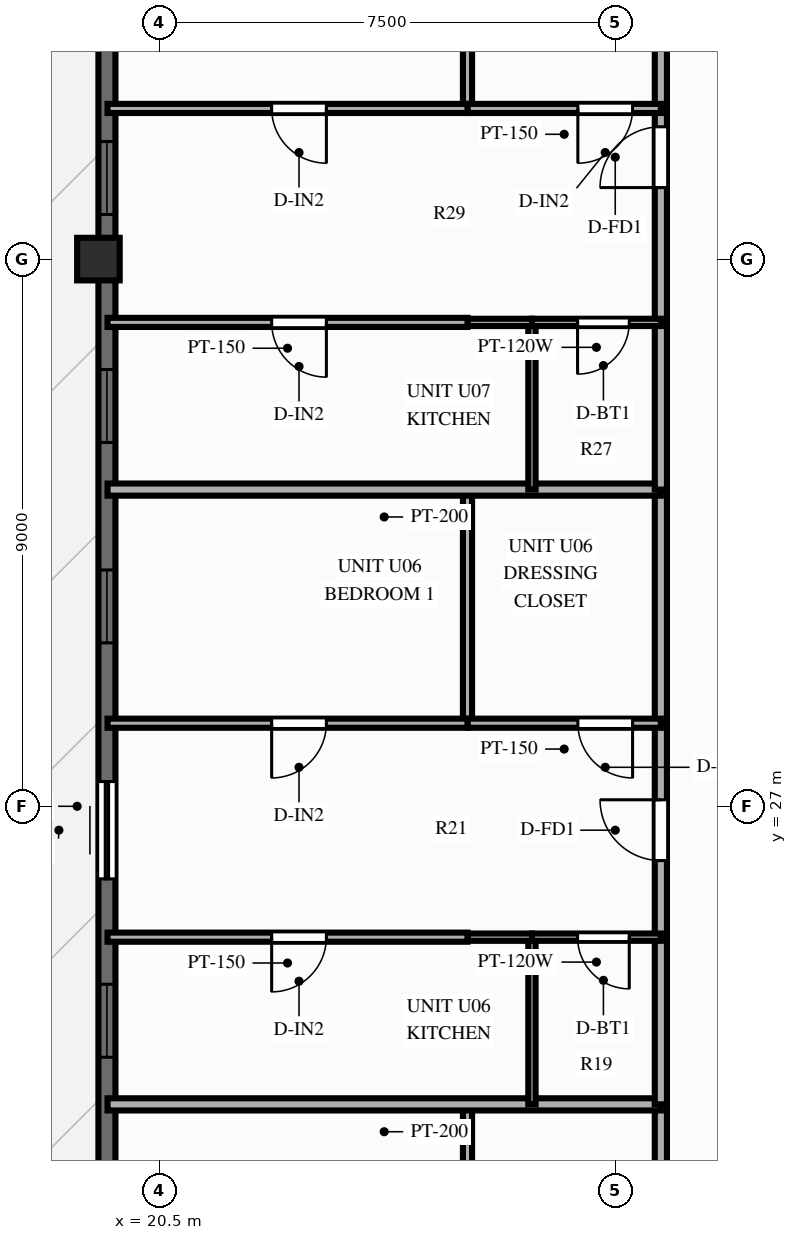
"""IFC4 building model, lengths in metres.
Left out: names, types, materials, properties, quantities, classifications, styles, units other than length and angle.
Written with IfcOpenShell. Run it as: python <this file> out.ifc"""

import sys

from ifc_helpers import new_model, si_unit, direction, frame, frame_2d, origin, origin_2d, place, context, subcontext, project, spatial, rectangle, extrude, source, transform, mapped, element, fill, save


model = new_model("IFC4")
c1 = context("Model", 3, precision=1e-05, world=origin(), true_north=direction((0.0, 1.0)))
c2 = subcontext(c1, "Body", "Model", "MODEL_VIEW")
j1 = project(units=[si_unit("LENGTHUNIT", "METRE"), si_unit("PLANEANGLEUNIT", "RADIAN")], contexts=[c1])
p1 = place(None, origin())
s1 = spatial("IfcSite", under=j1, at=p1, CompositionType="ELEMENT")
p2 = place(p1, origin())
s2 = spatial("IfcBuilding", under=s1, at=p2, CompositionType="ELEMENT")
p3 = place(p2, frame((0.0, 0.0, 216.3)))
s3 = spatial("IfcBuildingStorey", under=s2, at=p3, CompositionType="ELEMENT", Elevation=216.3)
m1 = source(origin(), c2, "Body", "SweptSolid", [
    extrude(rectangle(XDim=0.7, YDim=0.7, at=origin_2d()), origin(), (0.0, 0.0, 1.0), 3.9),
])
p4 = place(p3, frame((19.5, 36.0, 0.0), z_axis=(0.0, 0.0, 1.0), x_axis=(1.0, 0.0, 0.0)))
e1 = element("IfcColumn", 1, at=p4, inside=s3, PredefinedType="COLUMN", context=c2, shape_type="MappedRepresentation", body=[
    mapped(m1, transform((0.0, 0.0, 0.0), scale=1.0)),
])
p5 = place(p3, frame((19.64, 11.5, 0.0), z_axis=(0.0, 0.0, 1.0), x_axis=(0.0, 1.0, 0.0)))
e2 = element("IfcWall", 2, at=p5, inside=s3, PredefinedType="SOLIDWALL", context=c2, shape_type="SweptSolid", body=[
    extrude(rectangle(XDim=31.0, YDim=0.28, at=frame_2d((15.5, 0.0))), origin(), (0.0, 0.0, 1.0), 2.44),
])
p6 = place(p5, frame((0.96, 0.0, 0.25)))
e3 = element("IfcOpeningElement", 3, at=p6, cuts=e2, PredefinedType="OPENING", context=c2, shape_type="SweptSolid", body=[
    extrude(rectangle(XDim=1.2, YDim=1.5, at=frame_2d((0.6, 0.75))), frame((0.0, 0.152, 0.0), z_axis=(0.0, -1.0, 0.0), x_axis=(1.0, 0.0, 0.0)), (0.0, 0.0, 1.0), 0.304),
])
p7 = place(p5, frame((4.02, 0.0, 0.25)))
e4 = element("IfcOpeningElement", 4, at=p7, cuts=e2, PredefinedType="OPENING", context=c2, shape_type="SweptSolid", body=[
    extrude(rectangle(XDim=1.2, YDim=1.5, at=frame_2d((0.6, 0.75))), frame((0.0, 0.152, 0.0), z_axis=(0.0, -1.0, 0.0), x_axis=(1.0, 0.0, 0.0)), (0.0, 0.0, 1.0), 0.304),
])
p8 = place(p5, frame((8.089, 0.0, 0.25)))
e5 = element("IfcOpeningElement", 5, at=p8, cuts=e2, PredefinedType="OPENING", context=c2, shape_type="SweptSolid", body=[
    extrude(rectangle(XDim=1.2, YDim=1.5, at=frame_2d((0.6, 0.75))), frame((0.0, 0.152, 0.0), z_axis=(0.0, -1.0, 0.0), x_axis=(1.0, 0.0, 0.0)), (0.0, 0.0, 1.0), 0.304),
])
p9 = place(p5, frame((11.373, 0.0, 0.25)))
e6 = element("IfcOpeningElement", 6, at=p9, cuts=e2, PredefinedType="OPENING", context=c2, shape_type="SweptSolid", body=[
    extrude(rectangle(XDim=1.2, YDim=1.5, at=frame_2d((0.6, 0.75))), frame((0.0, 0.152, 0.0), z_axis=(0.0, -1.0, 0.0), x_axis=(1.0, 0.0, 0.0)), (0.0, 0.0, 1.0), 0.304),
])
p10 = place(p5, frame((14.307, 0.0, 0.0)))
e7 = element("IfcOpeningElement", 7, at=p10, cuts=e2, PredefinedType="OPENING", context=c2, shape_type="SweptSolid", body=[
    extrude(rectangle(XDim=1.6, YDim=2.15, at=frame_2d((0.8, 1.075))), frame((0.0, 0.152, 0.0), z_axis=(0.0, -1.0, 0.0), x_axis=(1.0, 0.0, 0.0)), (0.0, 0.0, 1.0), 0.304),
])
p11 = place(p5, frame((18.188, 0.0, 0.25)))
e8 = element("IfcOpeningElement", 8, at=p11, cuts=e2, PredefinedType="OPENING", context=c2, shape_type="SweptSolid", body=[
    extrude(rectangle(XDim=1.2, YDim=1.5, at=frame_2d((0.6, 0.75))), frame((0.0, 0.152, 0.0), z_axis=(0.0, -1.0, 0.0), x_axis=(1.0, 0.0, 0.0)), (0.0, 0.0, 1.0), 0.304),
])
p12 = place(p5, frame((21.484, 0.0, 0.25)))
e9 = element("IfcOpeningElement", 9, at=p12, cuts=e2, PredefinedType="OPENING", context=c2, shape_type="SweptSolid", body=[
    extrude(rectangle(XDim=1.2, YDim=1.5, at=frame_2d((0.6, 0.75))), frame((0.0, 0.152, 0.0), z_axis=(0.0, -1.0, 0.0), x_axis=(1.0, 0.0, 0.0)), (0.0, 0.0, 1.0), 0.304),
])
p13 = place(p5, frame((25.234, 0.0, 0.25)))
e10 = element("IfcOpeningElement", 10, at=p13, cuts=e2, PredefinedType="OPENING", context=c2, shape_type="SweptSolid", body=[
    extrude(rectangle(XDim=1.2, YDim=1.5, at=frame_2d((0.6, 0.75))), frame((0.0, 0.152, 0.0), z_axis=(0.0, -1.0, 0.0), x_axis=(1.0, 0.0, 0.0)), (0.0, 0.0, 1.0), 0.304),
])
p14 = place(p5, frame((28.294, 0.0, 0.25)))
e11 = element("IfcOpeningElement", 11, at=p14, cuts=e2, PredefinedType="OPENING", context=c2, shape_type="SweptSolid", body=[
    extrude(rectangle(XDim=1.2, YDim=1.5, at=frame_2d((0.6, 0.75))), frame((0.0, 0.152, 0.0), z_axis=(0.0, -1.0, 0.0), x_axis=(1.0, 0.0, 0.0)), (0.0, 0.0, 1.0), 0.304),
])
p15 = place(p3, frame((28.75, 18.28, 0.0), z_axis=(0.0, 0.0, 1.0), x_axis=(0.0, 1.0, 0.0)))
e12 = element("IfcWall", 12, at=p15, inside=s3, PredefinedType="PARTITIONING", context=c2, shape_type="SweptSolid", body=[
    extrude(rectangle(XDim=3.818, YDim=0.2, at=frame_2d((1.909, 0.0))), origin(), (0.0, 0.0, 1.0), 3.56),
])
p16 = place(p3, frame((25.57, 18.28, 0.0), z_axis=(0.0, 0.0, 1.0), x_axis=(0.0, 1.0, 0.0)))
e13 = element("IfcWall", 13, at=p16, inside=s3, PredefinedType="PARTITIONING", context=c2, shape_type="SweptSolid", body=[
    extrude(rectangle(XDim=3.818, YDim=0.15, at=frame_2d((1.909, 0.0))), origin(), (0.0, 0.0, 1.0), 3.39),
])
p17 = place(p3, frame((28.75, 22.098, 0.0), z_axis=(0.0, 0.0, 1.0), x_axis=(-1.0, 0.0, 0.0)))
e14 = element("IfcWall", 14, at=p17, inside=s3, PredefinedType="PARTITIONING", context=c2, shape_type="SweptSolid", body=[
    extrude(rectangle(XDim=9.1, YDim=0.2, at=frame_2d((4.55, 0.0))), origin(), (0.0, 0.0, 1.0), 3.29),
])
p18 = place(p3, frame((28.75, 22.098, 0.0), z_axis=(0.0, 0.0, 1.0), x_axis=(0.0, 1.0, 0.0)))
e15 = element("IfcWall", 15, at=p18, inside=s3, PredefinedType="PARTITIONING", context=c2, shape_type="SweptSolid", body=[
    extrude(rectangle(XDim=2.75, YDim=0.2, at=frame_2d((1.375, 0.0))), origin(), (0.0, 0.0, 1.0), 3.56),
])
p19 = place(p3, frame((28.75, 24.848, 0.0), z_axis=(0.0, 0.0, 1.0), x_axis=(0.0, 1.0, 0.0)))
e16 = element("IfcWall", 16, at=p19, inside=s3, PredefinedType="PARTITIONING", context=c2, shape_type="SweptSolid", body=[
    extrude(rectangle(XDim=3.519, YDim=0.2, at=frame_2d((1.759, 0.0))), origin(), (0.0, 0.0, 1.0), 3.56),
])
p20 = place(p19, frame((1.26, 0.0, 0.0)))
e17 = element("IfcOpeningElement", 17, at=p20, cuts=e16, PredefinedType="OPENING", context=c2, shape_type="SweptSolid", body=[
    extrude(rectangle(XDim=1.0, YDim=2.15, at=frame_2d((0.5, 1.075))), frame((0.0, 0.112, 0.0), z_axis=(0.0, -1.0, 0.0), x_axis=(1.0, 0.0, 0.0)), (0.0, 0.0, 1.0), 0.224),
])
p21 = place(p3, frame((28.75, 28.366, 0.0), z_axis=(0.0, 0.0, 1.0), x_axis=(0.0, 1.0, 0.0)))
e18 = element("IfcWall", 18, at=p21, inside=s3, PredefinedType="PARTITIONING", context=c2, shape_type="SweptSolid", body=[
    extrude(rectangle(XDim=3.842, YDim=0.2, at=frame_2d((1.921, 0.0))), origin(), (0.0, 0.0, 1.0), 3.56),
])
p22 = place(p3, frame((26.63, 22.098, 0.0), z_axis=(0.0, 0.0, 1.0), x_axis=(0.0, 1.0, 0.0)))
e19 = element("IfcWall", 19, at=p22, inside=s3, PredefinedType="PARTITIONING", context=c2, shape_type="SweptSolid", body=[
    extrude(rectangle(XDim=2.75, YDim=0.12, at=frame_2d((1.375, 0.0))), origin(), (0.0, 0.0, 1.0), 3.56),
])
p23 = place(p3, frame((25.57, 28.366, 0.0), z_axis=(0.0, 0.0, 1.0), x_axis=(0.0, 1.0, 0.0)))
e20 = element("IfcWall", 20, at=p23, inside=s3, PredefinedType="PARTITIONING", context=c2, shape_type="SweptSolid", body=[
    extrude(rectangle(XDim=3.842, YDim=0.15, at=frame_2d((1.921, 0.0))), origin(), (0.0, 0.0, 1.0), 3.39),
])
p24 = place(p3, frame((28.75, 24.848, 0.0), z_axis=(0.0, 0.0, 1.0), x_axis=(-1.0, 0.0, 0.0)))
e21 = element("IfcWall", 21, at=p24, inside=s3, PredefinedType="PARTITIONING", context=c2, shape_type="SweptSolid", body=[
    extrude(rectangle(XDim=2.12, YDim=0.12, at=frame_2d((1.06, 0.0))), origin(), (0.0, 0.0, 1.0), 3.56),
])
p25 = place(p24, frame((0.52, 0.0, 0.0)))
e22 = element("IfcOpeningElement", 22, at=p25, cuts=e21, PredefinedType="OPENING", context=c2, shape_type="SweptSolid", body=[
    extrude(rectangle(XDim=0.85, YDim=2.05, at=frame_2d((0.425, 1.025))), frame((0.0, 0.072, 0.0), z_axis=(0.0, -1.0, 0.0), x_axis=(1.0, 0.0, 0.0)), (0.0, 0.0, 1.0), 0.144),
])
p26 = place(p3, frame((26.63, 24.848, 0.0), z_axis=(0.0, 0.0, 1.0), x_axis=(-1.0, 0.0, 0.0)))
e23 = element("IfcWall", 23, at=p26, inside=s3, PredefinedType="PARTITIONING", context=c2, shape_type="SweptSolid", body=[
    extrude(rectangle(XDim=1.06, YDim=0.12, at=frame_2d((0.53, 0.0))), origin(), (0.0, 0.0, 1.0), 3.56),
])
p27 = place(p3, frame((25.57, 24.848, 0.0), z_axis=(0.0, 0.0, 1.0), x_axis=(-1.0, 0.0, 0.0)))
e24 = element("IfcWall", 24, at=p27, inside=s3, PredefinedType="PARTITIONING", context=c2, shape_type="SweptSolid", body=[
    extrude(rectangle(XDim=5.92, YDim=0.15, at=frame_2d((2.96, 0.0))), origin(), (0.0, 0.0, 1.0), 3.56),
])
p28 = place(p27, frame((2.321, 0.0, 0.0)))
e25 = element("IfcOpeningElement", 25, at=p28, cuts=e24, PredefinedType="OPENING", context=c2, shape_type="SweptSolid", body=[
    extrude(rectangle(XDim=0.9, YDim=2.1, at=frame_2d((0.45, 1.05))), frame((0.0, 0.087, 0.0), z_axis=(0.0, -1.0, 0.0), x_axis=(1.0, 0.0, 0.0)), (0.0, 0.0, 1.0), 0.174),
])
p29 = place(p3, frame((28.75, 28.366, 0.0), z_axis=(0.0, 0.0, 1.0), x_axis=(-1.0, 0.0, 0.0)))
e26 = element("IfcWall", 26, at=p29, inside=s3, PredefinedType="PARTITIONING", context=c2, shape_type="SweptSolid", body=[
    extrude(rectangle(XDim=3.18, YDim=0.15, at=frame_2d((1.59, 0.0))), origin(), (0.0, 0.0, 1.0), 3.56),
])
p30 = place(p29, frame((0.465, 0.0, 0.0)))
e27 = element("IfcOpeningElement", 27, at=p30, cuts=e26, PredefinedType="OPENING", context=c2, shape_type="SweptSolid", body=[
    extrude(rectangle(XDim=0.9, YDim=2.1, at=frame_2d((0.45, 1.05))), frame((0.0, 0.087, 0.0), z_axis=(0.0, -1.0, 0.0), x_axis=(1.0, 0.0, 0.0)), (0.0, 0.0, 1.0), 0.174),
])
p31 = place(p3, frame((25.57, 28.366, 0.0), z_axis=(0.0, 0.0, 1.0), x_axis=(-1.0, 0.0, 0.0)))
e28 = element("IfcWall", 28, at=p31, inside=s3, PredefinedType="PARTITIONING", context=c2, shape_type="SweptSolid", body=[
    extrude(rectangle(XDim=5.92, YDim=0.15, at=frame_2d((2.96, 0.0))), origin(), (0.0, 0.0, 1.0), 3.56),
])
p32 = place(p31, frame((2.321, 0.0, 0.0)))
e29 = element("IfcOpeningElement", 29, at=p32, cuts=e28, PredefinedType="OPENING", context=c2, shape_type="SweptSolid", body=[
    extrude(rectangle(XDim=0.9, YDim=2.1, at=frame_2d((0.45, 1.05))), frame((0.0, 0.087, 0.0), z_axis=(0.0, -1.0, 0.0), x_axis=(1.0, 0.0, 0.0)), (0.0, 0.0, 1.0), 0.174),
])
p33 = place(p3, frame((28.75, 32.209, 0.0), z_axis=(0.0, 0.0, 1.0), x_axis=(-1.0, 0.0, 0.0)))
e30 = element("IfcWall", 30, at=p33, inside=s3, PredefinedType="PARTITIONING", context=c2, shape_type="SweptSolid", body=[
    extrude(rectangle(XDim=9.1, YDim=0.2, at=frame_2d((4.55, 0.0))), origin(), (0.0, 0.0, 1.0), 3.29),
])
p34 = place(p3, frame((28.75, 32.209, 0.0), z_axis=(0.0, 0.0, 1.0), x_axis=(0.0, 1.0, 0.0)))
e31 = element("IfcWall", 31, at=p34, inside=s3, PredefinedType="PARTITIONING", context=c2, shape_type="SweptSolid", body=[
    extrude(rectangle(XDim=2.75, YDim=0.2, at=frame_2d((1.375, 0.0))), origin(), (0.0, 0.0, 1.0), 3.56),
])
p35 = place(p3, frame((28.75, 34.959, 0.0), z_axis=(0.0, 0.0, 1.0), x_axis=(0.0, 1.0, 0.0)))
e32 = element("IfcWall", 32, at=p35, inside=s3, PredefinedType="PARTITIONING", context=c2, shape_type="SweptSolid", body=[
    extrude(rectangle(XDim=3.519, YDim=0.2, at=frame_2d((1.76, 0.0))), origin(), (0.0, 0.0, 1.0), 3.56),
])
p36 = place(p35, frame((2.217, 0.0, 0.0)))
e33 = element("IfcOpeningElement", 33, at=p36, cuts=e32, PredefinedType="OPENING", context=c2, shape_type="SweptSolid", body=[
    extrude(rectangle(XDim=1.0, YDim=2.15, at=frame_2d((0.5, 1.075))), frame((0.0, 0.112, 0.0), z_axis=(0.0, -1.0, 0.0), x_axis=(1.0, 0.0, 0.0)), (0.0, 0.0, 1.0), 0.224),
])
p37 = place(p3, frame((28.75, 38.478, 0.0), z_axis=(0.0, 0.0, 1.0), x_axis=(0.0, 1.0, 0.0)))
e34 = element("IfcWall", 34, at=p37, inside=s3, PredefinedType="PARTITIONING", context=c2, shape_type="SweptSolid", body=[
    extrude(rectangle(XDim=3.842, YDim=0.2, at=frame_2d((1.921, 0.0))), origin(), (0.0, 0.0, 1.0), 3.56),
])
p38 = place(p3, frame((26.63, 32.209, 0.0), z_axis=(0.0, 0.0, 1.0), x_axis=(0.0, 1.0, 0.0)))
e35 = element("IfcWall", 35, at=p38, inside=s3, PredefinedType="PARTITIONING", context=c2, shape_type="SweptSolid", body=[
    extrude(rectangle(XDim=2.75, YDim=0.12, at=frame_2d((1.375, 0.0))), origin(), (0.0, 0.0, 1.0), 3.56),
])
p39 = place(p3, frame((25.57, 38.478, 0.0), z_axis=(0.0, 0.0, 1.0), x_axis=(0.0, 1.0, 0.0)))
e36 = element("IfcWall", 36, at=p39, inside=s3, PredefinedType="PARTITIONING", context=c2, shape_type="SweptSolid", body=[
    extrude(rectangle(XDim=3.842, YDim=0.15, at=frame_2d((1.921, 0.0))), origin(), (0.0, 0.0, 1.0), 3.56),
])
p40 = place(p3, frame((28.75, 34.959, 0.0), z_axis=(0.0, 0.0, 1.0), x_axis=(-1.0, 0.0, 0.0)))
e37 = element("IfcWall", 37, at=p40, inside=s3, PredefinedType="PARTITIONING", context=c2, shape_type="SweptSolid", body=[
    extrude(rectangle(XDim=2.12, YDim=0.12, at=frame_2d((1.06, 0.0))), origin(), (0.0, 0.0, 1.0), 3.56),
])
p41 = place(p40, frame((0.52, 0.0, 0.0)))
e38 = element("IfcOpeningElement", 38, at=p41, cuts=e37, PredefinedType="OPENING", context=c2, shape_type="SweptSolid", body=[
    extrude(rectangle(XDim=0.85, YDim=2.05, at=frame_2d((0.425, 1.025))), frame((0.0, 0.072, 0.0), z_axis=(0.0, -1.0, 0.0), x_axis=(1.0, 0.0, 0.0)), (0.0, 0.0, 1.0), 0.144),
])
p42 = place(p3, frame((26.63, 34.959, 0.0), z_axis=(0.0, 0.0, 1.0), x_axis=(-1.0, 0.0, 0.0)))
e39 = element("IfcWall", 39, at=p42, inside=s3, PredefinedType="PARTITIONING", context=c2, shape_type="SweptSolid", body=[
    extrude(rectangle(XDim=1.06, YDim=0.12, at=frame_2d((0.53, 0.0))), origin(), (0.0, 0.0, 1.0), 3.56),
])
p43 = place(p3, frame((25.57, 34.959, 0.0), z_axis=(0.0, 0.0, 1.0), x_axis=(-1.0, 0.0, 0.0)))
e40 = element("IfcWall", 40, at=p43, inside=s3, PredefinedType="PARTITIONING", context=c2, shape_type="SweptSolid", body=[
    extrude(rectangle(XDim=5.92, YDim=0.15, at=frame_2d((2.96, 0.0))), origin(), (0.0, 0.0, 1.0), 3.56),
])
p44 = place(p43, frame((2.321, 0.0, 0.0)))
e41 = element("IfcOpeningElement", 41, at=p44, cuts=e40, PredefinedType="OPENING", context=c2, shape_type="SweptSolid", body=[
    extrude(rectangle(XDim=0.9, YDim=2.1, at=frame_2d((0.45, 1.05))), frame((0.0, 0.087, 0.0), z_axis=(0.0, -1.0, 0.0), x_axis=(1.0, 0.0, 0.0)), (0.0, 0.0, 1.0), 0.174),
])
p45 = place(p3, frame((28.75, 38.478, 0.0), z_axis=(0.0, 0.0, 1.0), x_axis=(-1.0, 0.0, 0.0)))
e42 = element("IfcWall", 42, at=p45, inside=s3, PredefinedType="PARTITIONING", context=c2, shape_type="SweptSolid", body=[
    extrude(rectangle(XDim=3.18, YDim=0.15, at=frame_2d((1.59, 0.0))), origin(), (0.0, 0.0, 1.0), 3.56),
])
p46 = place(p45, frame((0.465, 0.0, 0.0)))
e43 = element("IfcOpeningElement", 43, at=p46, cuts=e42, PredefinedType="OPENING", context=c2, shape_type="SweptSolid", body=[
    extrude(rectangle(XDim=0.9, YDim=2.1, at=frame_2d((0.45, 1.05))), frame((0.0, 0.087, 0.0), z_axis=(0.0, -1.0, 0.0), x_axis=(1.0, 0.0, 0.0)), (0.0, 0.0, 1.0), 0.174),
])
p47 = place(p3, frame((25.57, 38.478, 0.0), z_axis=(0.0, 0.0, 1.0), x_axis=(-1.0, 0.0, 0.0)))
e44 = element("IfcWall", 44, at=p47, inside=s3, PredefinedType="PARTITIONING", context=c2, shape_type="SweptSolid", body=[
    extrude(rectangle(XDim=5.92, YDim=0.15, at=frame_2d((2.96, 0.0))), origin(), (0.0, 0.0, 1.0), 3.56),
])
p48 = place(p47, frame((2.321, 0.0, 0.0)))
e45 = element("IfcOpeningElement", 45, at=p48, cuts=e44, PredefinedType="OPENING", context=c2, shape_type="SweptSolid", body=[
    extrude(rectangle(XDim=0.9, YDim=2.1, at=frame_2d((0.45, 1.05))), frame((0.0, 0.087, 0.0), z_axis=(0.0, -1.0, 0.0), x_axis=(1.0, 0.0, 0.0)), (0.0, 0.0, 1.0), 0.174),
])
m2 = source(origin(), c2, "Body", "SweptSolid", [
    extrude(rectangle(XDim=1.2, YDim=1.5, at=frame_2d((0.6, 0.75))), frame((0.0, 0.03, 0.0), z_axis=(0.0, -1.0, 0.0), x_axis=(1.0, 0.0, 0.0)), (0.0, 0.0, 1.0), 0.06),
])
p49 = place(p9, origin())
e46 = element("IfcWindow", 46, at=p49, inside=s3, PartitioningType="SINGLE_PANEL", PredefinedType="WINDOW", context=c2, shape_type="MappedRepresentation", body=[
    mapped(m2, transform((0.0, 0.0, 0.0), scale=1.0)),
])
fill(e6, e46)
m3 = source(origin(), c2, "Body", "SweptSolid", [
    extrude(rectangle(XDim=1.6, YDim=2.15, at=frame_2d((0.8, 1.075))), frame((0.0, 0.025, 0.0), z_axis=(0.0, -1.0, 0.0), x_axis=(1.0, 0.0, 0.0)), (0.0, 0.0, 1.0), 0.05),
])
p50 = place(p10, origin())
e47 = element("IfcDoor", 47, at=p50, inside=s3, OperationType="SLIDING_TO_LEFT", PredefinedType="DOOR", context=c2, shape_type="MappedRepresentation", body=[
    mapped(m3, transform((0.0, 0.0, 0.0), scale=1.0)),
])
fill(e7, e47)
p51 = place(p11, origin())
e48 = element("IfcWindow", 48, at=p51, inside=s3, PartitioningType="SINGLE_PANEL", PredefinedType="WINDOW", context=c2, shape_type="MappedRepresentation", body=[
    mapped(m2, transform((0.0, 0.0, 0.0), scale=1.0)),
])
fill(e8, e48)
p52 = place(p12, origin())
e49 = element("IfcWindow", 49, at=p52, inside=s3, PartitioningType="SINGLE_PANEL", PredefinedType="WINDOW", context=c2, shape_type="MappedRepresentation", body=[
    mapped(m2, transform((0.0, 0.0, 0.0), scale=1.0)),
])
fill(e9, e49)
p53 = place(p13, origin())
e50 = element("IfcWindow", 50, at=p53, inside=s3, PartitioningType="SINGLE_PANEL", PredefinedType="WINDOW", context=c2, shape_type="MappedRepresentation", body=[
    mapped(m2, transform((0.0, 0.0, 0.0), scale=1.0)),
])
fill(e10, e50)
m4 = source(origin(), c2, "Body", "SweptSolid", [
    extrude(rectangle(XDim=1.0, YDim=2.15, at=frame_2d((0.5, 1.075))), frame((0.0, 0.025, 0.0), z_axis=(0.0, -1.0, 0.0), x_axis=(1.0, 0.0, 0.0)), (0.0, 0.0, 1.0), 0.05),
])
p54 = place(p20, origin())
e51 = element("IfcDoor", 51, at=p54, inside=s3, OperationType="SINGLE_SWING_RIGHT", PredefinedType="DOOR", context=c2, shape_type="MappedRepresentation", body=[
    mapped(m4, transform((0.0, 0.0, 0.0), scale=1.0)),
])
fill(e17, e51)
m5 = source(origin(), c2, "Body", "SweptSolid", [
    extrude(rectangle(XDim=0.85, YDim=2.05, at=frame_2d((0.425, 1.025))), frame((0.0, 0.025, 0.0), z_axis=(0.0, -1.0, 0.0), x_axis=(1.0, 0.0, 0.0)), (0.0, 0.0, 1.0), 0.05),
])
p55 = place(p25, origin())
e52 = element("IfcDoor", 52, at=p55, inside=s3, OperationType="SINGLE_SWING_LEFT", PredefinedType="DOOR", context=c2, shape_type="MappedRepresentation", body=[
    mapped(m5, transform((0.0, 0.0, 0.0), scale=1.0)),
])
fill(e22, e52)
m6 = source(origin(), c2, "Body", "SweptSolid", [
    extrude(rectangle(XDim=0.9, YDim=2.1, at=frame_2d((0.45, 1.05))), frame((0.0, 0.025, 0.0), z_axis=(0.0, -1.0, 0.0), x_axis=(1.0, 0.0, 0.0)), (0.0, 0.0, 1.0), 0.05),
])
p56 = place(p28, origin())
e53 = element("IfcDoor", 53, at=p56, inside=s3, OperationType="SINGLE_SWING_RIGHT", PredefinedType="DOOR", context=c2, shape_type="MappedRepresentation", body=[
    mapped(m6, transform((0.0, 0.0, 0.0), scale=1.0)),
])
fill(e25, e53)
p57 = place(p30, origin())
e54 = element("IfcDoor", 54, at=p57, inside=s3, OperationType="SINGLE_SWING_LEFT", PredefinedType="DOOR", context=c2, shape_type="MappedRepresentation", body=[
    mapped(m6, transform((0.0, 0.0, 0.0), scale=1.0)),
])
fill(e27, e54)
p58 = place(p32, origin())
e55 = element("IfcDoor", 55, at=p58, inside=s3, OperationType="SINGLE_SWING_RIGHT", PredefinedType="DOOR", context=c2, shape_type="MappedRepresentation", body=[
    mapped(m6, transform((0.0, 0.0, 0.0), scale=1.0)),
])
fill(e29, e55)
p59 = place(p36, origin())
e56 = element("IfcDoor", 56, at=p59, inside=s3, OperationType="SINGLE_SWING_LEFT", PredefinedType="DOOR", context=c2, shape_type="MappedRepresentation", body=[
    mapped(m4, transform((0.0, 0.0, 0.0), scale=1.0)),
])
fill(e33, e56)
p60 = place(p41, origin())
e57 = element("IfcDoor", 57, at=p60, inside=s3, OperationType="SINGLE_SWING_RIGHT", PredefinedType="DOOR", context=c2, shape_type="MappedRepresentation", body=[
    mapped(m5, transform((0.0, 0.0, 0.0), scale=1.0)),
])
fill(e38, e57)
p61 = place(p44, origin())
e58 = element("IfcDoor", 58, at=p61, inside=s3, OperationType="SINGLE_SWING_LEFT", PredefinedType="DOOR", context=c2, shape_type="MappedRepresentation", body=[
    mapped(m6, transform((0.0, 0.0, 0.0), scale=1.0)),
])
fill(e41, e58)
p62 = place(p46, origin())
e59 = element("IfcDoor", 59, at=p62, inside=s3, OperationType="SINGLE_SWING_RIGHT", PredefinedType="DOOR", context=c2, shape_type="MappedRepresentation", body=[
    mapped(m6, transform((0.0, 0.0, 0.0), scale=1.0)),
])
fill(e43, e59)
p63 = place(p48, origin())
e60 = element("IfcDoor", 60, at=p63, inside=s3, OperationType="SINGLE_SWING_LEFT", PredefinedType="DOOR", context=c2, shape_type="MappedRepresentation", body=[
    mapped(m6, transform((0.0, 0.0, 0.0), scale=1.0)),
])
fill(e45, e60)
save(model, sys.argv[1])
